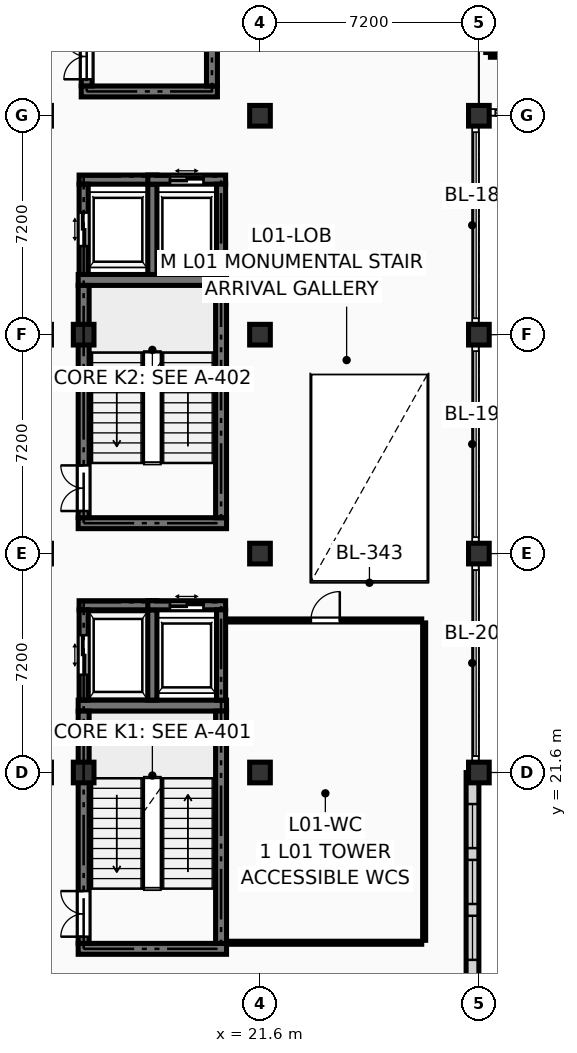
"""IFC4 building model, lengths in metres.
Left out: names, types, materials, properties, quantities, classifications, styles, units other than length and angle.
Written with IfcOpenShell. Run it as: python <this file> out.ifc"""

import sys

from ifc_helpers import new_model, si_unit, direction, frame, frame_2d, origin, origin_2d, place, context, subcontext, project, spatial, rectangle, extrude, element, fill, save


model = new_model("IFC4")
c1 = context("Model", 3, precision=1e-05, world=origin(), true_north=direction((0.0, 1.0)))
c2 = subcontext(c1, "Body", "Model", "MODEL_VIEW")
j1 = project(units=[si_unit("LENGTHUNIT", "METRE"), si_unit("PLANEANGLEUNIT", "RADIAN")], contexts=[c1])
p1 = place(None, origin())
s1 = spatial("IfcSite", under=j1, at=p1, CompositionType="ELEMENT")
p2 = place(p1, origin())
s2 = spatial("IfcBuilding", under=s1, at=p2, CompositionType="ELEMENT")
p3 = place(p2, frame((0.0, 0.0, 4.5)))
s3 = spatial("IfcBuildingStorey", under=s2, at=p3, CompositionType="ELEMENT", Elevation=4.5)
for number, where, z_axis, x_axis in (
    (1, (15.8, 21.6, 0.0), (0.0, 0.0, 1.0), (1.0, 0.0, 0.0)),
    (2, (15.8, 36.0, 0.0), (0.0, 0.0, 1.0), (1.0, 0.0, 0.0)),
    (3, (21.6, 21.6, 0.0), (0.0, 0.0, 1.0), (1.0, 0.0, 0.0)),
    (4, (21.6, 28.8, 0.0), (0.0, 0.0, 1.0), (1.0, 0.0, 0.0)),
    (5, (21.6, 36.0, 0.0), (0.0, 0.0, 1.0), (1.0, 0.0, 0.0)),
    (6, (21.6, 43.2, 0.0), (0.0, 0.0, 1.0), (1.0, 0.0, 0.0)),
    (7, (28.8, 21.6, 0.0), (0.0, 0.0, 1.0), (1.0, 0.0, 0.0)),
    (8, (28.8, 28.8, 0.0), (0.0, 0.0, 1.0), (1.0, 0.0, 0.0)),
    (9, (28.8, 36.0, 0.0), (0.0, 0.0, 1.0), (1.0, 0.0, 0.0)),
    (10, (28.8, 43.2, 0.0), (0.0, 0.0, 1.0), (1.0, 0.0, 0.0)),
):
    element("IfcColumn", number, at=place(p3, frame(where, z_axis=z_axis, x_axis=x_axis)), inside=s3, PredefinedType="COLUMN", context=c2, shape_type="SweptSolid", body=[
        extrude(rectangle(XDim=0.68, YDim=0.68, at=origin_2d()), origin(), (0.0, 0.0, 1.0), 4.05),
    ])
p4 = place(p3, frame((28.59, 14.4, 0.0), z_axis=(0.0, 0.0, 1.0), x_axis=(0.0, 1.0, 0.0)))
e11 = element("IfcWall", 11, at=p4, inside=s3, PredefinedType="SOLIDWALL", context=c2, shape_type="SweptSolid", body=[
    extrude(rectangle(XDim=7.2, YDim=0.42, at=frame_2d((3.6, 0.0))), origin(), (0.0, 0.0, 1.0), 3.16),
])
p5 = place(p4, frame((1.038, 0.0, 0.18)))
e12 = element("IfcOpeningElement", 12, at=p5, cuts=e11, PredefinedType="OPENING", context=c2, shape_type="SweptSolid", body=[
    extrude(rectangle(XDim=1.45, YDim=2.8, at=frame_2d((0.725, 1.4))), frame((0.0, 0.222, 0.0), z_axis=(0.0, -1.0, 0.0), x_axis=(1.0, 0.0, 0.0)), (0.0, 0.0, 1.0), 0.444),
])
p6 = place(p4, frame((2.875, 0.0, 0.18)))
e13 = element("IfcOpeningElement", 13, at=p6, cuts=e11, PredefinedType="OPENING", context=c2, shape_type="SweptSolid", body=[
    extrude(rectangle(XDim=1.45, YDim=2.8, at=frame_2d((0.725, 1.4))), frame((0.0, 0.222, 0.0), z_axis=(0.0, -1.0, 0.0), x_axis=(1.0, 0.0, 0.0)), (0.0, 0.0, 1.0), 0.444),
])
p7 = place(p4, frame((4.712, 0.0, 0.18)))
e14 = element("IfcOpeningElement", 14, at=p7, cuts=e11, PredefinedType="OPENING", context=c2, shape_type="SweptSolid", body=[
    extrude(rectangle(XDim=1.45, YDim=2.8, at=frame_2d((0.725, 1.4))), frame((0.0, 0.222, 0.0), z_axis=(0.0, -1.0, 0.0), x_axis=(1.0, 0.0, 0.0)), (0.0, 0.0, 1.0), 0.444),
])
for number, where, z_axis, x_axis in (
    (15, (15.62, 15.8, 0.0), (0.0, 0.0, 1.0), (1.0, 0.0, 0.0)),
    (16, (15.62, 23.8, 0.0), (0.0, 0.0, 1.0), (1.0, 0.0, 0.0)),
):
    element("IfcWall", number, at=place(p3, frame(where, z_axis=z_axis, x_axis=x_axis)), inside=s3, PredefinedType="SHEAR", context=c2, shape_type="SweptSolid", body=[
        extrude(rectangle(XDim=4.88, YDim=0.36, at=frame_2d((2.44, 0.0))), origin(), (0.0, 0.0, 1.0), 3.79),
    ])
p8 = place(p3, frame((15.8, 15.98, 0.0), z_axis=(0.0, 0.0, 1.0), x_axis=(0.0, 1.0, 0.0)))
e17 = element("IfcWall", 17, at=p8, inside=s3, PredefinedType="SHEAR", context=c2, shape_type="SweptSolid", body=[
    extrude(rectangle(XDim=7.64, YDim=0.36, at=frame_2d((3.82, 0.0))), origin(), (0.0, 0.0, 1.0), 3.79),
])
p9 = place(p8, frame((0.22, 0.0, 0.0)))
e18 = element("IfcOpeningElement", 18, at=p9, cuts=e17, PredefinedType="OPENING", context=c2, shape_type="SweptSolid", body=[
    extrude(rectangle(XDim=1.5, YDim=2.2, at=frame_2d((0.75, 1.1))), frame((0.0, 0.192, 0.0), z_axis=(0.0, -1.0, 0.0), x_axis=(1.0, 0.0, 0.0)), (0.0, 0.0, 1.0), 0.384),
])
p10 = place(p3, frame((20.32, 15.98, 0.0), z_axis=(0.0, 0.0, 1.0), x_axis=(0.0, 1.0, 0.0)))
e19 = element("IfcWall", 19, at=p10, inside=s3, PredefinedType="SHEAR", context=c2, shape_type="SweptSolid", body=[
    extrude(rectangle(XDim=7.64, YDim=0.36, at=frame_2d((3.82, 0.0))), origin(), (0.0, 0.0, 1.0), 3.79),
])
for number, where, z_axis, x_axis in (
    (20, (15.62, 29.8, 0.0), (0.0, 0.0, 1.0), (1.0, 0.0, 0.0)),
    (21, (15.62, 37.8, 0.0), (0.0, 0.0, 1.0), (1.0, 0.0, 0.0)),
):
    element("IfcWall", number, at=place(p3, frame(where, z_axis=z_axis, x_axis=x_axis)), inside=s3, PredefinedType="SHEAR", context=c2, shape_type="SweptSolid", body=[
        extrude(rectangle(XDim=4.88, YDim=0.36, at=frame_2d((2.44, 0.0))), origin(), (0.0, 0.0, 1.0), 3.79),
    ])
p11 = place(p3, frame((15.8, 29.98, 0.0), z_axis=(0.0, 0.0, 1.0), x_axis=(0.0, 1.0, 0.0)))
e22 = element("IfcWall", 22, at=p11, inside=s3, PredefinedType="SHEAR", context=c2, shape_type="SweptSolid", body=[
    extrude(rectangle(XDim=7.64, YDim=0.36, at=frame_2d((3.82, 0.0))), origin(), (0.0, 0.0, 1.0), 3.79),
])
p12 = place(p11, frame((0.22, 0.0, 0.0)))
e23 = element("IfcOpeningElement", 23, at=p12, cuts=e22, PredefinedType="OPENING", context=c2, shape_type="SweptSolid", body=[
    extrude(rectangle(XDim=1.5, YDim=2.2, at=frame_2d((0.75, 1.1))), frame((0.0, 0.192, 0.0), z_axis=(0.0, -1.0, 0.0), x_axis=(1.0, 0.0, 0.0)), (0.0, 0.0, 1.0), 0.384),
])
p13 = place(p3, frame((20.32, 29.98, 0.0), z_axis=(0.0, 0.0, 1.0), x_axis=(0.0, 1.0, 0.0)))
e24 = element("IfcWall", 24, at=p13, inside=s3, PredefinedType="SHEAR", context=c2, shape_type="SweptSolid", body=[
    extrude(rectangle(XDim=7.64, YDim=0.36, at=frame_2d((3.82, 0.0))), origin(), (0.0, 0.0, 1.0), 3.79),
])
p14 = place(p3, frame((15.72, 44.0, 0.0), z_axis=(0.0, 0.0, 1.0), x_axis=(1.0, 0.0, 0.0)))
e25 = element("IfcWall", 25, at=p14, inside=s3, PredefinedType="SHEAR", context=c2, shape_type="SweptSolid", body=[
    extrude(rectangle(XDim=4.48, YDim=0.36, at=frame_2d((2.24, 0.0))), origin(), (0.0, 0.0, 1.0), 3.79),
])
p15 = place(p3, frame((15.9, 44.18, 0.0), z_axis=(0.0, 0.0, 1.0), x_axis=(0.0, 1.0, 0.0)))
e26 = element("IfcWall", 26, at=p15, inside=s3, PredefinedType="SHEAR", context=c2, shape_type="SweptSolid", body=[
    extrude(rectangle(XDim=7.24, YDim=0.36, at=frame_2d((3.62, 0.0))), origin(), (0.0, 0.0, 1.0), 3.79),
])
p16 = place(p15, frame((0.22, 0.0, 0.0)))
e27 = element("IfcOpeningElement", 27, at=p16, cuts=e26, PredefinedType="OPENING", context=c2, shape_type="SweptSolid", body=[
    extrude(rectangle(XDim=1.5, YDim=2.2, at=frame_2d((0.75, 1.1))), frame((0.0, 0.192, 0.0), z_axis=(0.0, -1.0, 0.0), x_axis=(1.0, 0.0, 0.0)), (0.0, 0.0, 1.0), 0.384),
])
p17 = place(p3, frame((20.02, 44.18, 0.0), z_axis=(0.0, 0.0, 1.0), x_axis=(0.0, 1.0, 0.0)))
e28 = element("IfcWall", 28, at=p17, inside=s3, PredefinedType="SHEAR", context=c2, shape_type="SweptSolid", body=[
    extrude(rectangle(XDim=7.24, YDim=0.36, at=frame_2d((3.62, 0.0))), origin(), (0.0, 0.0, 1.0), 3.79),
])
p18 = place(p3, frame((15.65, 27.1, 0.0), z_axis=(0.0, 0.0, 1.0), x_axis=(1.0, 0.0, 0.0)))
e29 = element("IfcWall", 29, at=p18, inside=s3, PredefinedType="SHEAR", context=c2, shape_type="SweptSolid", body=[
    extrude(rectangle(XDim=2.56, YDim=0.3, at=frame_2d((1.28, 0.0))), origin(), (0.0, 0.0, 1.0), 3.79),
])
p19 = place(p3, frame((15.8, 23.98, 0.0), z_axis=(0.0, 0.0, 1.0), x_axis=(0.0, 1.0, 0.0)))
e30 = element("IfcWall", 30, at=p19, inside=s3, PredefinedType="SHEAR", context=c2, shape_type="SweptSolid", body=[
    extrude(rectangle(XDim=2.97, YDim=0.3, at=frame_2d((1.485, 0.0))), origin(), (0.0, 0.0, 1.0), 3.79),
])
p20 = place(p19, frame((0.835, 0.0, 0.0)))
e31 = element("IfcOpeningElement", 31, at=p20, cuts=e30, PredefinedType="OPENING", context=c2, shape_type="SweptSolid", body=[
    extrude(rectangle(XDim=1.3, YDim=2.25, at=frame_2d((0.65, 1.125))), frame((0.0, 0.162, 0.0), z_axis=(0.0, -1.0, 0.0), x_axis=(1.0, 0.0, 0.0)), (0.0, 0.0, 1.0), 0.324),
])
p21 = place(p3, frame((18.06, 23.98, 0.0), z_axis=(0.0, 0.0, 1.0), x_axis=(0.0, 1.0, 0.0)))
e32 = element("IfcWall", 32, at=p21, inside=s3, PredefinedType="SHEAR", context=c2, shape_type="SweptSolid", body=[
    extrude(rectangle(XDim=2.97, YDim=0.3, at=frame_2d((1.485, 0.0))), origin(), (0.0, 0.0, 1.0), 3.79),
])
p22 = place(p3, frame((17.91, 27.1, 0.0), z_axis=(0.0, 0.0, 1.0), x_axis=(1.0, 0.0, 0.0)))
e33 = element("IfcWall", 33, at=p22, inside=s3, PredefinedType="SHEAR", context=c2, shape_type="SweptSolid", body=[
    extrude(rectangle(XDim=2.56, YDim=0.3, at=frame_2d((1.28, 0.0))), origin(), (0.0, 0.0, 1.0), 3.79),
])
p23 = place(p22, frame((0.73, 0.0, 0.0)))
e34 = element("IfcOpeningElement", 34, at=p23, cuts=e33, PredefinedType="OPENING", context=c2, shape_type="SweptSolid", body=[
    extrude(rectangle(XDim=1.1, YDim=2.2, at=frame_2d((0.55, 1.1))), frame((0.0, 0.162, 0.0), z_axis=(0.0, -1.0, 0.0), x_axis=(1.0, 0.0, 0.0)), (0.0, 0.0, 1.0), 0.324),
])
p24 = place(p3, frame((20.32, 23.98, 0.0), z_axis=(0.0, 0.0, 1.0), x_axis=(0.0, 1.0, 0.0)))
e35 = element("IfcWall", 35, at=p24, inside=s3, PredefinedType="SHEAR", context=c2, shape_type="SweptSolid", body=[
    extrude(rectangle(XDim=2.97, YDim=0.3, at=frame_2d((1.485, 0.0))), origin(), (0.0, 0.0, 1.0), 3.79),
])
p25 = place(p3, frame((15.65, 41.1, 0.0), z_axis=(0.0, 0.0, 1.0), x_axis=(1.0, 0.0, 0.0)))
e36 = element("IfcWall", 36, at=p25, inside=s3, PredefinedType="SHEAR", context=c2, shape_type="SweptSolid", body=[
    extrude(rectangle(XDim=2.56, YDim=0.3, at=frame_2d((1.28, 0.0))), origin(), (0.0, 0.0, 1.0), 3.79),
])
p26 = place(p3, frame((15.8, 37.98, 0.0), z_axis=(0.0, 0.0, 1.0), x_axis=(0.0, 1.0, 0.0)))
e37 = element("IfcWall", 37, at=p26, inside=s3, PredefinedType="SHEAR", context=c2, shape_type="SweptSolid", body=[
    extrude(rectangle(XDim=2.97, YDim=0.3, at=frame_2d((1.485, 0.0))), origin(), (0.0, 0.0, 1.0), 3.79),
])
p27 = place(p26, frame((0.935, 0.0, 0.0)))
e38 = element("IfcOpeningElement", 38, at=p27, cuts=e37, PredefinedType="OPENING", context=c2, shape_type="SweptSolid", body=[
    extrude(rectangle(XDim=1.1, YDim=2.2, at=frame_2d((0.55, 1.1))), frame((0.0, 0.162, 0.0), z_axis=(0.0, -1.0, 0.0), x_axis=(1.0, 0.0, 0.0)), (0.0, 0.0, 1.0), 0.324),
])
p28 = place(p3, frame((18.06, 37.98, 0.0), z_axis=(0.0, 0.0, 1.0), x_axis=(0.0, 1.0, 0.0)))
e39 = element("IfcWall", 39, at=p28, inside=s3, PredefinedType="SHEAR", context=c2, shape_type="SweptSolid", body=[
    extrude(rectangle(XDim=2.97, YDim=0.3, at=frame_2d((1.485, 0.0))), origin(), (0.0, 0.0, 1.0), 3.79),
])
p29 = place(p3, frame((17.91, 41.1, 0.0), z_axis=(0.0, 0.0, 1.0), x_axis=(1.0, 0.0, 0.0)))
e40 = element("IfcWall", 40, at=p29, inside=s3, PredefinedType="SHEAR", context=c2, shape_type="SweptSolid", body=[
    extrude(rectangle(XDim=2.56, YDim=0.3, at=frame_2d((1.28, 0.0))), origin(), (0.0, 0.0, 1.0), 3.79),
])
p30 = place(p29, frame((0.73, 0.0, 0.0)))
e41 = element("IfcOpeningElement", 41, at=p30, cuts=e40, PredefinedType="OPENING", context=c2, shape_type="SweptSolid", body=[
    extrude(rectangle(XDim=1.1, YDim=2.2, at=frame_2d((0.55, 1.1))), frame((0.0, 0.162, 0.0), z_axis=(0.0, -1.0, 0.0), x_axis=(1.0, 0.0, 0.0)), (0.0, 0.0, 1.0), 0.324),
])
p31 = place(p3, frame((20.32, 37.98, 0.0), z_axis=(0.0, 0.0, 1.0), x_axis=(0.0, 1.0, 0.0)))
e42 = element("IfcWall", 42, at=p31, inside=s3, PredefinedType="SHEAR", context=c2, shape_type="SweptSolid", body=[
    extrude(rectangle(XDim=2.97, YDim=0.3, at=frame_2d((1.485, 0.0))), origin(), (0.0, 0.0, 1.0), 3.79),
])
p32 = place(p3, frame((20.58, 16.0, 0.0), z_axis=(0.0, 0.0, 1.0), x_axis=(1.0, 0.0, 0.0)))
e43 = element("IfcWall", 43, at=p32, inside=s3, PredefinedType="PARTITIONING", context=c2, shape_type="SweptSolid", body=[
    extrude(rectangle(XDim=6.34, YDim=0.1, at=frame_2d((3.17, 0.0))), origin(), (0.0, 0.0, 1.0), 3.775),
])
p33 = place(p3, frame((27.0, 16.08, 0.0), z_axis=(0.0, 0.0, 1.0), x_axis=(0.0, 1.0, 0.0)))
e44 = element("IfcWall", 44, at=p33, inside=s3, PredefinedType="PARTITIONING", context=c2, shape_type="SweptSolid", body=[
    extrude(rectangle(XDim=10.44, YDim=0.1, at=frame_2d((5.22, 0.0))), origin(), (0.0, 0.0, 1.0), 3.775),
])
p34 = place(p3, frame((20.58, 26.6, 0.0), z_axis=(0.0, 0.0, 1.0), x_axis=(1.0, 0.0, 0.0)))
e45 = element("IfcWall", 45, at=p34, inside=s3, PredefinedType="PARTITIONING", context=c2, shape_type="SweptSolid", body=[
    extrude(rectangle(XDim=6.34, YDim=0.1, at=frame_2d((3.17, 0.0))), origin(), (0.0, 0.0, 1.0), 3.775),
])
p35 = place(p34, frame((2.695, 0.0, 0.0)))
e46 = element("IfcOpeningElement", 46, at=p35, cuts=e45, PredefinedType="OPENING", context=c2, shape_type="SweptSolid", body=[
    extrude(rectangle(XDim=0.95, YDim=2.1, at=frame_2d((0.475, 1.05))), frame((0.0, 0.062, 0.0), z_axis=(0.0, -1.0, 0.0), x_axis=(1.0, 0.0, 0.0)), (0.0, 0.0, 1.0), 0.124),
])
p36 = place(p3, frame((29.1, 45.28, 0.0), z_axis=(0.0, 0.0, 1.0), x_axis=(0.0, 1.0, 0.0)))
e47 = element("IfcWall", 47, at=p36, inside=s3, PredefinedType="PARTITIONING", context=c2, shape_type="SweptSolid", body=[
    extrude(rectangle(XDim=10.64, YDim=0.15, at=frame_2d((5.32, 0.0))), origin(), (0.0, 0.0, 1.0), 2.925),
])
p37 = place(p3, frame((29.18, 45.2, 0.0), z_axis=(0.0, 0.0, 1.0), x_axis=(1.0, 0.0, 0.0)))
e48 = element("IfcWall", 48, at=p37, inside=s3, PredefinedType="PARTITIONING", context=c2, shape_type="SweptSolid", body=[
    extrude(rectangle(XDim=8.54, YDim=0.15, at=frame_2d((4.27, 0.0))), origin(), (0.0, 0.0, 1.0), 3.775),
])
p38 = place(p37, frame((3.595, 0.0, 0.0)))
e49 = element("IfcOpeningElement", 49, at=p38, cuts=e48, PredefinedType="OPENING", context=c2, shape_type="SweptSolid", body=[
    extrude(rectangle(XDim=1.35, YDim=2.2, at=frame_2d((0.675, 1.1))), frame((0.0, 0.087, 0.0), z_axis=(0.0, -1.0, 0.0), x_axis=(1.0, 0.0, 0.0)), (0.0, 0.0, 1.0), 0.174),
])
p39 = place(p5, origin())
e50 = element("IfcWindow", 50, at=p39, inside=s3, PartitioningType="SINGLE_PANEL", PredefinedType="WINDOW", context=c2, shape_type="SweptSolid", body=[
    extrude(rectangle(XDim=1.45, YDim=2.8, at=frame_2d((0.725, 1.4))), frame((0.0, 0.03, 0.0), z_axis=(0.0, -1.0, 0.0), x_axis=(1.0, 0.0, 0.0)), (0.0, 0.0, 1.0), 0.06),
])
fill(e12, e50)
p40 = place(p6, origin())
e51 = element("IfcWindow", 51, at=p40, inside=s3, PartitioningType="SINGLE_PANEL", PredefinedType="WINDOW", context=c2, shape_type="SweptSolid", body=[
    extrude(rectangle(XDim=1.45, YDim=2.8, at=frame_2d((0.725, 1.4))), frame((0.0, 0.03, 0.0), z_axis=(0.0, -1.0, 0.0), x_axis=(1.0, 0.0, 0.0)), (0.0, 0.0, 1.0), 0.06),
])
fill(e13, e51)
p41 = place(p7, origin())
e52 = element("IfcWindow", 52, at=p41, inside=s3, PartitioningType="SINGLE_PANEL", PredefinedType="WINDOW", context=c2, shape_type="SweptSolid", body=[
    extrude(rectangle(XDim=1.45, YDim=2.8, at=frame_2d((0.725, 1.4))), frame((0.0, 0.03, 0.0), z_axis=(0.0, -1.0, 0.0), x_axis=(1.0, 0.0, 0.0)), (0.0, 0.0, 1.0), 0.06),
])
fill(e14, e52)
p42 = place(p9, origin())
e53 = element("IfcDoor", 53, at=p42, inside=s3, OperationType="DOUBLE_DOOR_SINGLE_SWING", PredefinedType="DOOR", context=c2, shape_type="SweptSolid", body=[
    extrude(rectangle(XDim=1.5, YDim=2.2, at=frame_2d((0.75, 1.1))), frame((0.0, 0.025, 0.0), z_axis=(0.0, -1.0, 0.0), x_axis=(1.0, 0.0, 0.0)), (0.0, 0.0, 1.0), 0.05),
])
fill(e18, e53)
p43 = place(p12, origin())
e54 = element("IfcDoor", 54, at=p43, inside=s3, OperationType="DOUBLE_DOOR_SINGLE_SWING", PredefinedType="DOOR", context=c2, shape_type="SweptSolid", body=[
    extrude(rectangle(XDim=1.5, YDim=2.2, at=frame_2d((0.75, 1.1))), frame((0.0, 0.025, 0.0), z_axis=(0.0, -1.0, 0.0), x_axis=(1.0, 0.0, 0.0)), (0.0, 0.0, 1.0), 0.05),
])
fill(e23, e54)
p44 = place(p16, origin())
e55 = element("IfcDoor", 55, at=p44, inside=s3, OperationType="DOUBLE_DOOR_SINGLE_SWING", PredefinedType="DOOR", context=c2, shape_type="SweptSolid", body=[
    extrude(rectangle(XDim=1.5, YDim=2.2, at=frame_2d((0.75, 1.1))), frame((0.0, 0.025, 0.0), z_axis=(0.0, -1.0, 0.0), x_axis=(1.0, 0.0, 0.0)), (0.0, 0.0, 1.0), 0.05),
])
fill(e27, e55)
p45 = place(p20, origin())
e56 = element("IfcDoor", 56, at=p45, inside=s3, OperationType="DOUBLE_DOOR_SLIDING", PredefinedType="DOOR", context=c2, shape_type="SweptSolid", body=[
    extrude(rectangle(XDim=1.3, YDim=2.25, at=frame_2d((0.65, 1.125))), frame((0.0, 0.025, 0.0), z_axis=(0.0, -1.0, 0.0), x_axis=(1.0, 0.0, 0.0)), (0.0, 0.0, 1.0), 0.05),
])
fill(e31, e56)
p46 = place(p23, origin())
e57 = element("IfcDoor", 57, at=p46, inside=s3, OperationType="DOUBLE_DOOR_SLIDING", PredefinedType="DOOR", context=c2, shape_type="SweptSolid", body=[
    extrude(rectangle(XDim=1.1, YDim=2.2, at=frame_2d((0.55, 1.1))), frame((0.0, 0.025, 0.0), z_axis=(0.0, -1.0, 0.0), x_axis=(1.0, 0.0, 0.0)), (0.0, 0.0, 1.0), 0.05),
])
fill(e34, e57)
p47 = place(p27, origin())
e58 = element("IfcDoor", 58, at=p47, inside=s3, OperationType="DOUBLE_DOOR_SLIDING", PredefinedType="DOOR", context=c2, shape_type="SweptSolid", body=[
    extrude(rectangle(XDim=1.1, YDim=2.2, at=frame_2d((0.55, 1.1))), frame((0.0, 0.025, 0.0), z_axis=(0.0, -1.0, 0.0), x_axis=(1.0, 0.0, 0.0)), (0.0, 0.0, 1.0), 0.05),
])
fill(e38, e58)
p48 = place(p30, origin())
e59 = element("IfcDoor", 59, at=p48, inside=s3, OperationType="DOUBLE_DOOR_SLIDING", PredefinedType="DOOR", context=c2, shape_type="SweptSolid", body=[
    extrude(rectangle(XDim=1.1, YDim=2.2, at=frame_2d((0.55, 1.1))), frame((0.0, 0.025, 0.0), z_axis=(0.0, -1.0, 0.0), x_axis=(1.0, 0.0, 0.0)), (0.0, 0.0, 1.0), 0.05),
])
fill(e41, e59)
p49 = place(p35, origin())
e60 = element("IfcDoor", 60, at=p49, inside=s3, OperationType="SINGLE_SWING_RIGHT", PredefinedType="DOOR", context=c2, shape_type="SweptSolid", body=[
    extrude(rectangle(XDim=0.95, YDim=2.1, at=frame_2d((0.475, 1.05))), frame((0.0, 0.025, 0.0), z_axis=(0.0, -1.0, 0.0), x_axis=(1.0, 0.0, 0.0)), (0.0, 0.0, 1.0), 0.05),
])
fill(e46, e60)
save(model, sys.argv[1])
